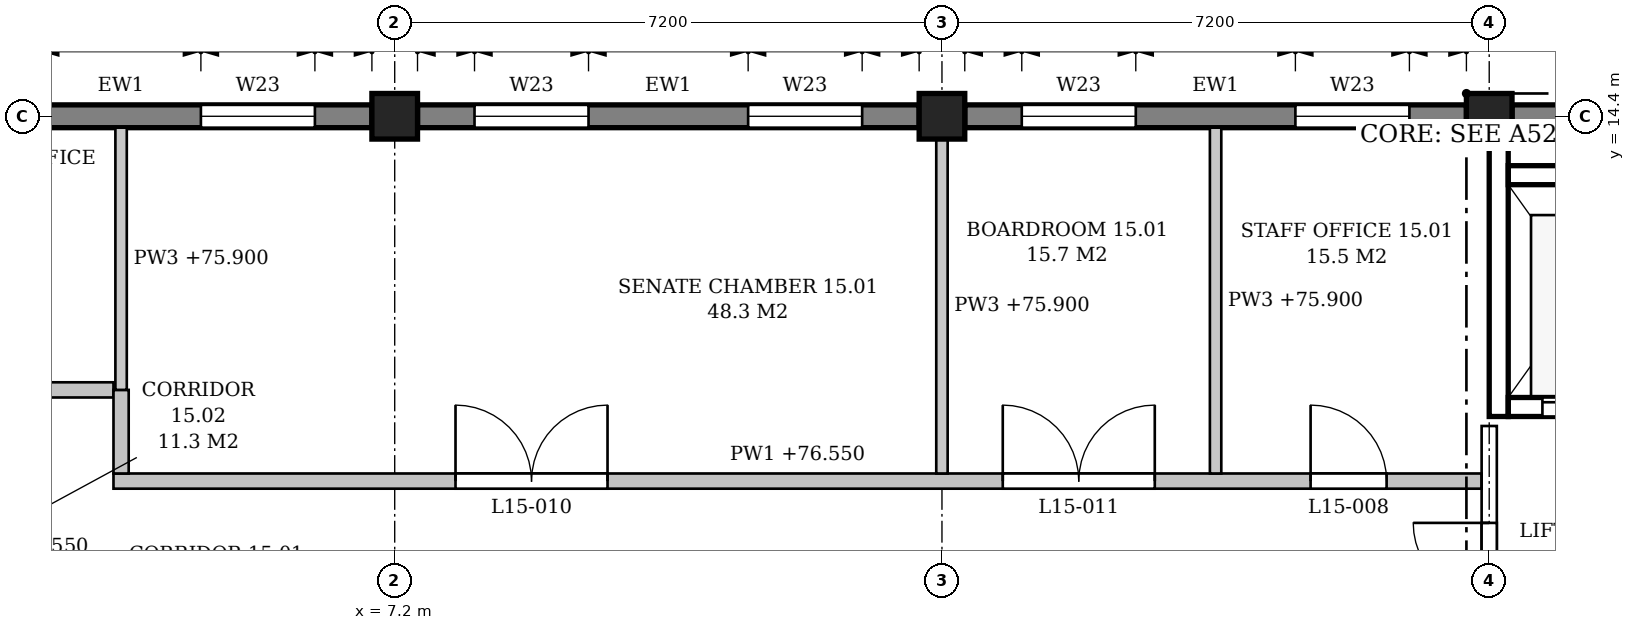
"""IFC4 building model, lengths in metres.
Left out: names, types, materials, properties, quantities, classifications, styles, units other than length and angle.
Written with IfcOpenShell. Run it as: python <this file> out.ifc"""

import sys

from ifc_helpers import new_model, si_unit, direction, frame, frame_2d, origin, origin_2d, place, context, subcontext, project, spatial, polyline, rectangle, outline, extrude, element, fill, save


model = new_model("IFC4")
c1 = context("Model", 3, precision=1e-05, world=origin(), true_north=direction((0.0, 1.0)))
c2 = subcontext(c1, "Body", "Model", "MODEL_VIEW")
j1 = project(units=[si_unit("LENGTHUNIT", "METRE"), si_unit("PLANEANGLEUNIT", "RADIAN")], contexts=[c1])
p1 = place(None, origin())
s1 = spatial("IfcSite", under=j1, at=p1, CompositionType="ELEMENT")
p2 = place(p1, origin())
s2 = spatial("IfcBuilding", under=s1, at=p2, CompositionType="ELEMENT")
p3 = place(p2, frame((0.0, 0.0, 72.3)))
s3 = spatial("IfcBuildingStorey", under=s2, at=p3, CompositionType="ELEMENT", Elevation=72.3)
for number, where, z_axis, x_axis in (
    (1, (7.2, 14.4, 0.0), (0.0, 0.0, 1.0), (1.0, 0.0, 0.0)),
    (2, (14.4, 14.4, 0.0), (0.0, 0.0, 1.0), (1.0, 0.0, 0.0)),
    (3, (21.6, 14.4, 0.0), (0.0, 0.0, 1.0), (1.0, 0.0, 0.0)),
):
    element("IfcColumn", number, at=place(p3, frame(where, z_axis=z_axis, x_axis=x_axis)), inside=s3, PredefinedType="COLUMN", context=c2, shape_type="SweptSolid", body=[
        extrude(rectangle(XDim=0.6, YDim=0.6, at=origin_2d()), origin(), (0.0, 0.0, 1.0), 4.5),
    ])
p4 = place(p3, frame((28.5, 14.4, 0.0), z_axis=(0.0, 0.0, 1.0), x_axis=(-1.0, 0.0, 0.0)))
e4 = element("IfcWall", 4, at=p4, inside=s3, PredefinedType="STANDARD", context=c2, shape_type="SweptSolid", body=[
    extrude(rectangle(XDim=6.6, YDim=0.3, at=frame_2d((3.3, 0.0))), origin(), (0.0, 0.0, 1.0), 3.65),
])
p5 = place(p3, frame((21.3, 14.4, 0.0), z_axis=(0.0, 0.0, 1.0), x_axis=(-1.0, 0.0, 0.0)))
e5 = element("IfcWall", 5, at=p5, inside=s3, PredefinedType="STANDARD", context=c2, shape_type="SweptSolid", body=[
    extrude(rectangle(XDim=6.6, YDim=0.3, at=frame_2d((3.3, 0.0))), origin(), (0.0, 0.0, 1.0), 3.65),
])
p6 = place(p5, frame((0.75, 0.0, 0.9)))
e6 = element("IfcOpeningElement", 6, at=p6, cuts=e5, PredefinedType="OPENING", context=c2, shape_type="SweptSolid", body=[
    extrude(outline(polyline([(0.0, 0.0), (1.5, 0.0), (1.5, 1.95), (0.75, 2.7), (0.0, 1.95), (0.0, 0.0)])), frame((0.0, 0.16, 0.0), z_axis=(0.0, -1.0, 0.0), x_axis=(1.0, 0.0, 0.0)), (0.0, 0.0, 1.0), 0.32),
])
p7 = place(p5, frame((4.35, 0.0, 0.9)))
e7 = element("IfcOpeningElement", 7, at=p7, cuts=e5, PredefinedType="OPENING", context=c2, shape_type="SweptSolid", body=[
    extrude(outline(polyline([(0.0, 0.0), (1.5, 0.0), (1.5, 1.95), (0.75, 2.7), (0.0, 1.95), (0.0, 0.0)])), frame((0.0, 0.16, 0.0), z_axis=(0.0, -1.0, 0.0), x_axis=(1.0, 0.0, 0.0)), (0.0, 0.0, 1.0), 0.32),
])
p8 = place(p3, frame((14.1, 14.4, 0.0), z_axis=(0.0, 0.0, 1.0), x_axis=(-1.0, 0.0, 0.0)))
e8 = element("IfcWall", 8, at=p8, inside=s3, PredefinedType="STANDARD", context=c2, shape_type="SweptSolid", body=[
    extrude(rectangle(XDim=6.6, YDim=0.3, at=frame_2d((3.3, 0.0))), origin(), (0.0, 0.0, 1.0), 3.65),
])
p9 = place(p8, frame((0.75, 0.0, 0.9)))
e9 = element("IfcOpeningElement", 9, at=p9, cuts=e8, PredefinedType="OPENING", context=c2, shape_type="SweptSolid", body=[
    extrude(outline(polyline([(0.0, 0.0), (1.5, 0.0), (1.5, 1.95), (0.75, 2.7), (0.0, 1.95), (0.0, 0.0)])), frame((0.0, 0.16, 0.0), z_axis=(0.0, -1.0, 0.0), x_axis=(1.0, 0.0, 0.0)), (0.0, 0.0, 1.0), 0.32),
])
p10 = place(p8, frame((4.35, 0.0, 0.9)))
e10 = element("IfcOpeningElement", 10, at=p10, cuts=e8, PredefinedType="OPENING", context=c2, shape_type="SweptSolid", body=[
    extrude(outline(polyline([(0.0, 0.0), (1.5, 0.0), (1.5, 1.95), (0.75, 2.7), (0.0, 1.95), (0.0, 0.0)])), frame((0.0, 0.16, 0.0), z_axis=(0.0, -1.0, 0.0), x_axis=(1.0, 0.0, 0.0)), (0.0, 0.0, 1.0), 0.32),
])
p11 = place(p3, frame((6.9, 14.4, 0.0), z_axis=(0.0, 0.0, 1.0), x_axis=(-1.0, 0.0, 0.0)))
e11 = element("IfcWall", 11, at=p11, inside=s3, PredefinedType="STANDARD", context=c2, shape_type="SweptSolid", body=[
    extrude(rectangle(XDim=6.6, YDim=0.3, at=frame_2d((3.3, 0.0))), origin(), (0.0, 0.0, 1.0), 3.65),
])
p12 = place(p11, frame((0.75, 0.0, 0.9)))
e12 = element("IfcOpeningElement", 12, at=p12, cuts=e11, PredefinedType="OPENING", context=c2, shape_type="SweptSolid", body=[
    extrude(outline(polyline([(0.0, 0.0), (1.5, 0.0), (1.5, 1.95), (0.75, 2.7), (0.0, 1.95), (0.0, 0.0)])), frame((0.0, 0.16, 0.0), z_axis=(0.0, -1.0, 0.0), x_axis=(1.0, 0.0, 0.0)), (0.0, 0.0, 1.0), 0.32),
])
p13 = place(p11, frame((4.35, 0.0, 0.9)))
e13 = element("IfcOpeningElement", 13, at=p13, cuts=e11, PredefinedType="OPENING", context=c2, shape_type="SweptSolid", body=[
    extrude(outline(polyline([(0.0, 0.0), (1.5, 0.0), (1.5, 1.95), (0.75, 2.7), (0.0, 1.95), (0.0, 0.0)])), frame((0.0, 0.16, 0.0), z_axis=(0.0, -1.0, 0.0), x_axis=(1.0, 0.0, 0.0)), (0.0, 0.0, 1.0), 0.32),
])
p14 = place(p3, frame((21.725, 10.45, -0.25), z_axis=(0.0, 0.0, 1.0), x_axis=(0.0, 1.0, 0.0)))
e14 = element("IfcWall", 14, at=p14, inside=s3, PredefinedType="SHEAR", context=c2, shape_type="SweptSolid", body=[
    extrude(rectangle(XDim=3.65, YDim=0.25, at=frame_2d((1.825, 0.0))), origin(), (0.0, 0.0, 1.0), 3.85),
])
p15 = place(p3, frame((21.85, 10.575, -0.25), z_axis=(0.0, 0.0, 1.0), x_axis=(1.0, 0.0, 0.0)))
e15 = element("IfcWall", 15, at=p15, inside=s3, PredefinedType="SHEAR", context=c2, shape_type="SweptSolid", body=[
    extrude(rectangle(XDim=2.0, YDim=0.25, at=frame_2d((1.0, 0.0))), origin(), (0.0, 0.0, 1.0), 4.5),
])
p16 = place(p15, frame((0.45, 0.0, 0.25)))
e16 = element("IfcOpeningElement", 16, at=p16, cuts=e15, PredefinedType="OPENING", context=c2, shape_type="SweptSolid", body=[
    extrude(rectangle(XDim=1.1, YDim=2.1, at=frame_2d((0.55, 1.05))), frame((0.0, 0.135, 0.0), z_axis=(0.0, -1.0, 0.0), x_axis=(1.0, 0.0, 0.0)), (0.0, 0.0, 1.0), 0.27),
])
p17 = place(p3, frame((21.85, 13.625, -0.25), z_axis=(0.0, 0.0, 1.0), x_axis=(1.0, 0.0, 0.0)))
e17 = element("IfcWall", 17, at=p17, inside=s3, PredefinedType="SHEAR", context=c2, shape_type="SweptSolid", body=[
    extrude(rectangle(XDim=2.0, YDim=0.25, at=frame_2d((1.0, 0.0))), origin(), (0.0, 0.0, 1.0), 4.5),
])
p18 = place(p3, frame((3.5, 9.6, 0.0), z_axis=(0.0, 0.0, 1.0), x_axis=(1.0, 0.0, 0.0)))
e18 = element("IfcWall", 18, at=p18, inside=s3, PredefinedType="PARTITIONING", context=c2, shape_type="SweptSolid", body=[
    extrude(outline(polyline([(0.0, 0.0), (18.0, 0.0), (18.0, 3.6), (17.9, 3.6), (17.9, 4.25), (11.1, 4.25), (11.1, 3.6), (10.7, 3.6), (10.7, 4.25), (3.9, 4.25), (3.9, 3.6), (3.5, 3.6), (3.5, 4.25), (0.0, 4.25), (0.0, 0.0)])), frame((0.0, 0.1, 0.0), z_axis=(0.0, -1.0, 0.0), x_axis=(1.0, 0.0, 0.0)), (0.0, 0.0, 1.0), 0.2),
])
p19 = place(p18, frame((15.75, 0.0, 0.0)))
e19 = element("IfcOpeningElement", 19, at=p19, cuts=e18, PredefinedType="OPENING", context=c2, shape_type="SweptSolid", body=[
    extrude(rectangle(XDim=1.0, YDim=2.1, at=frame_2d((0.5, 1.05))), frame((0.0, 0.11, 0.0), z_axis=(0.0, -1.0, 0.0), x_axis=(1.0, 0.0, 0.0)), (0.0, 0.0, 1.0), 0.22),
])
p20 = place(p18, frame((4.5, 0.0, 0.0)))
e20 = element("IfcOpeningElement", 20, at=p20, cuts=e18, PredefinedType="OPENING", context=c2, shape_type="SweptSolid", body=[
    extrude(rectangle(XDim=2.0, YDim=2.1, at=frame_2d((1.0, 1.05))), frame((0.0, 0.11, 0.0), z_axis=(0.0, -1.0, 0.0), x_axis=(1.0, 0.0, 0.0)), (0.0, 0.0, 1.0), 0.22),
])
p21 = place(p18, frame((11.7, 0.0, 0.0)))
e21 = element("IfcOpeningElement", 21, at=p21, cuts=e18, PredefinedType="OPENING", context=c2, shape_type="SweptSolid", body=[
    extrude(rectangle(XDim=2.0, YDim=2.1, at=frame_2d((1.0, 1.05))), frame((0.0, 0.11, 0.0), z_axis=(0.0, -1.0, 0.0), x_axis=(1.0, 0.0, 0.0)), (0.0, 0.0, 1.0), 0.22),
])
p22 = place(p3, frame((0.15, 10.8, 0.0), z_axis=(0.0, 0.0, 1.0), x_axis=(1.0, 0.0, 0.0)))
e22 = element("IfcWall", 22, at=p22, inside=s3, PredefinedType="PARTITIONING", context=c2, shape_type="SweptSolid", body=[
    extrude(outline(polyline([(0.0, 0.0), (3.35, 0.0), (3.35, 4.25), (0.05, 4.25), (0.05, 3.65), (0.0, 3.65), (0.0, 0.0)])), frame((0.0, 0.1, 0.0), z_axis=(0.0, -1.0, 0.0), x_axis=(1.0, 0.0, 0.0)), (0.0, 0.0, 1.0), 0.2),
])
p23 = place(p22, frame((1.175, 0.0, 0.0)))
e23 = element("IfcOpeningElement", 23, at=p23, cuts=e22, PredefinedType="OPENING", context=c2, shape_type="SweptSolid", body=[
    extrude(rectangle(XDim=1.0, YDim=2.1, at=frame_2d((0.5, 1.05))), frame((0.0, 0.11, 0.0), z_axis=(0.0, -1.0, 0.0), x_axis=(1.0, 0.0, 0.0)), (0.0, 0.0, 1.0), 0.22),
])
p24 = place(p3, frame((3.6, 9.7, 0.0), z_axis=(0.0, 0.0, 1.0), x_axis=(0.0, 1.0, 0.0)))
e24 = element("IfcWall", 24, at=p24, inside=s3, PredefinedType="PARTITIONING", context=c2, shape_type="SweptSolid", body=[
    extrude(rectangle(XDim=1.1, YDim=0.2, at=frame_2d((0.55, 0.0))), origin(), (0.0, 0.0, 1.0), 4.25),
])
p25 = place(p3, frame((3.6, 10.8, 0.0), z_axis=(0.0, 0.0, 1.0), x_axis=(0.0, 1.0, 0.0)))
e25 = element("IfcWall", 25, at=p25, inside=s3, PredefinedType="PARTITIONING", context=c2, shape_type="SweptSolid", body=[
    extrude(rectangle(XDim=3.45, YDim=0.15, at=frame_2d((1.725, 0.0))), origin(), (0.0, 0.0, 1.0), 3.6),
])
p26 = place(p3, frame((14.4, 9.7, 0.0), z_axis=(0.0, 0.0, 1.0), x_axis=(0.0, 1.0, 0.0)))
e26 = element("IfcWall", 26, at=p26, inside=s3, PredefinedType="PARTITIONING", context=c2, shape_type="SweptSolid", body=[
    extrude(rectangle(XDim=4.4, YDim=0.15, at=frame_2d((2.2, 0.0))), origin(), (0.0, 0.0, 1.0), 3.6),
])
p27 = place(p3, frame((18.0, 9.7, 0.0), z_axis=(0.0, 0.0, 1.0), x_axis=(0.0, 1.0, 0.0)))
e27 = element("IfcWall", 27, at=p27, inside=s3, PredefinedType="PARTITIONING", context=c2, shape_type="SweptSolid", body=[
    extrude(rectangle(XDim=4.55, YDim=0.15, at=frame_2d((2.275, 0.0))), origin(), (0.0, 0.0, 1.0), 3.6),
])
p28 = place(p3, frame((21.6, 7.5, 0.0), z_axis=(0.0, 0.0, 1.0), x_axis=(0.0, 1.0, 0.0)))
e28 = element("IfcWall", 28, at=p28, inside=s3, PredefinedType="PARTITIONING", context=c2, shape_type="SweptSolid", body=[
    extrude(rectangle(XDim=2.825, YDim=0.2, at=frame_2d((1.413, 0.0))), origin(), (0.0, 0.0, 1.0), 3.6),
])
p29 = place(p28, frame((0.55, 0.0, 0.0)))
e29 = element("IfcOpeningElement", 29, at=p29, cuts=e28, PredefinedType="OPENING", context=c2, shape_type="SweptSolid", body=[
    extrude(rectangle(XDim=1.0, YDim=2.1, at=frame_2d((0.5, 1.05))), frame((0.0, 0.11, 0.0), z_axis=(0.0, -1.0, 0.0), x_axis=(1.0, 0.0, 0.0)), (0.0, 0.0, 1.0), 0.22),
])
p30 = place(p6, origin())
e30 = element("IfcWindow", 30, at=p30, inside=s3, PartitioningType="SINGLE_PANEL", PredefinedType="WINDOW", context=c2, shape_type="SweptSolid", body=[
    extrude(outline(polyline([(0.0, 0.0), (1.5, 0.0), (1.5, 1.95), (0.75, 2.7), (0.0, 1.95), (0.0, 0.0)])), frame((0.0, 0.03, 0.0), z_axis=(0.0, -1.0, 0.0), x_axis=(1.0, 0.0, 0.0)), (0.0, 0.0, 1.0), 0.06),
])
fill(e6, e30)
p31 = place(p7, origin())
e31 = element("IfcWindow", 31, at=p31, inside=s3, PartitioningType="SINGLE_PANEL", PredefinedType="WINDOW", context=c2, shape_type="SweptSolid", body=[
    extrude(outline(polyline([(0.0, 0.0), (1.5, 0.0), (1.5, 1.95), (0.75, 2.7), (0.0, 1.95), (0.0, 0.0)])), frame((0.0, 0.03, 0.0), z_axis=(0.0, -1.0, 0.0), x_axis=(1.0, 0.0, 0.0)), (0.0, 0.0, 1.0), 0.06),
])
fill(e7, e31)
p32 = place(p9, origin())
e32 = element("IfcWindow", 32, at=p32, inside=s3, PartitioningType="SINGLE_PANEL", PredefinedType="WINDOW", context=c2, shape_type="SweptSolid", body=[
    extrude(outline(polyline([(0.0, 0.0), (1.5, 0.0), (1.5, 1.95), (0.75, 2.7), (0.0, 1.95), (0.0, 0.0)])), frame((0.0, 0.03, 0.0), z_axis=(0.0, -1.0, 0.0), x_axis=(1.0, 0.0, 0.0)), (0.0, 0.0, 1.0), 0.06),
])
fill(e9, e32)
p33 = place(p10, origin())
e33 = element("IfcWindow", 33, at=p33, inside=s3, PartitioningType="SINGLE_PANEL", PredefinedType="WINDOW", context=c2, shape_type="SweptSolid", body=[
    extrude(outline(polyline([(0.0, 0.0), (1.5, 0.0), (1.5, 1.95), (0.75, 2.7), (0.0, 1.95), (0.0, 0.0)])), frame((0.0, 0.03, 0.0), z_axis=(0.0, -1.0, 0.0), x_axis=(1.0, 0.0, 0.0)), (0.0, 0.0, 1.0), 0.06),
])
fill(e10, e33)
p34 = place(p12, origin())
e34 = element("IfcWindow", 34, at=p34, inside=s3, PartitioningType="SINGLE_PANEL", PredefinedType="WINDOW", context=c2, shape_type="SweptSolid", body=[
    extrude(outline(polyline([(0.0, 0.0), (1.5, 0.0), (1.5, 1.95), (0.75, 2.7), (0.0, 1.95), (0.0, 0.0)])), frame((0.0, 0.03, 0.0), z_axis=(0.0, -1.0, 0.0), x_axis=(1.0, 0.0, 0.0)), (0.0, 0.0, 1.0), 0.06),
])
fill(e12, e34)
p35 = place(p16, origin())
e35 = element("IfcDoor", 35, at=p35, inside=s3, OperationType="SLIDING_TO_LEFT", PredefinedType="DOOR", context=c2, shape_type="SweptSolid", body=[
    extrude(rectangle(XDim=1.1, YDim=2.1, at=frame_2d((0.55, 1.05))), frame((0.0, 0.025, 0.0), z_axis=(0.0, -1.0, 0.0), x_axis=(1.0, 0.0, 0.0)), (0.0, 0.0, 1.0), 0.05),
])
fill(e16, e35)
p36 = place(p29, origin())
e36 = element("IfcDoor", 36, at=p36, inside=s3, OperationType="SINGLE_SWING_RIGHT", PredefinedType="DOOR", context=c2, shape_type="SweptSolid", body=[
    extrude(rectangle(XDim=1.0, YDim=2.1, at=frame_2d((0.5, 1.05))), frame((0.0, 0.025, 0.0), z_axis=(0.0, -1.0, 0.0), x_axis=(1.0, 0.0, 0.0)), (0.0, 0.0, 1.0), 0.05),
])
fill(e29, e36)
p37 = place(p19, origin())
e37 = element("IfcDoor", 37, at=p37, inside=s3, OperationType="SINGLE_SWING_LEFT", PredefinedType="DOOR", context=c2, shape_type="SweptSolid", body=[
    extrude(rectangle(XDim=1.0, YDim=2.1, at=frame_2d((0.5, 1.05))), frame((0.0, 0.025, 0.0), z_axis=(0.0, -1.0, 0.0), x_axis=(1.0, 0.0, 0.0)), (0.0, 0.0, 1.0), 0.05),
])
fill(e19, e37)
p38 = place(p20, origin())
e38 = element("IfcDoor", 38, at=p38, inside=s3, OperationType="DOUBLE_DOOR_SINGLE_SWING", PredefinedType="DOOR", context=c2, shape_type="SweptSolid", body=[
    extrude(rectangle(XDim=2.0, YDim=2.1, at=frame_2d((1.0, 1.05))), frame((0.0, 0.025, 0.0), z_axis=(0.0, -1.0, 0.0), x_axis=(1.0, 0.0, 0.0)), (0.0, 0.0, 1.0), 0.05),
])
fill(e20, e38)
p39 = place(p21, origin())
e39 = element("IfcDoor", 39, at=p39, inside=s3, OperationType="DOUBLE_DOOR_SINGLE_SWING", PredefinedType="DOOR", context=c2, shape_type="SweptSolid", body=[
    extrude(rectangle(XDim=2.0, YDim=2.1, at=frame_2d((1.0, 1.05))), frame((0.0, 0.025, 0.0), z_axis=(0.0, -1.0, 0.0), x_axis=(1.0, 0.0, 0.0)), (0.0, 0.0, 1.0), 0.05),
])
fill(e21, e39)
save(model, sys.argv[1])
